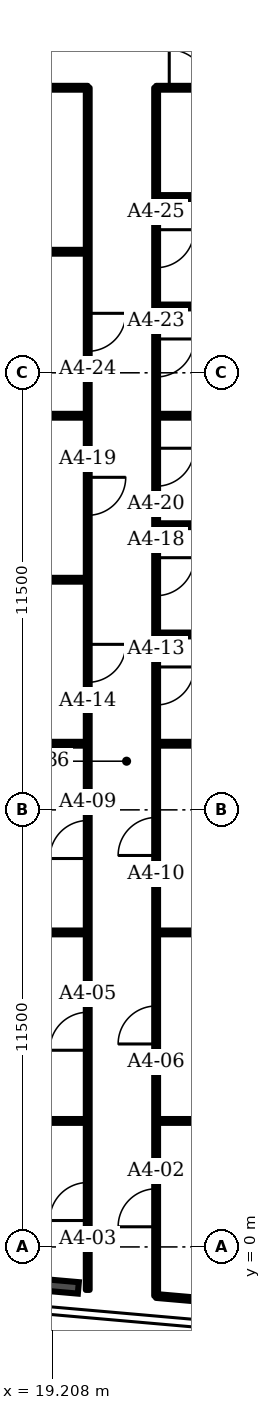
"""IFC4 building model, lengths in metres.
Left out: names, types, materials, properties, quantities, classifications, styles, units other than length and angle.
Written with IfcOpenShell. Run it as: python <this file> out.ifc"""

import sys

from ifc_helpers import new_model, si_unit, direction, frame, frame_2d, origin, origin_2d, place, context, subcontext, project, spatial, rectangle, i_section, extrude, element, fill, save


model = new_model("IFC4")
c1 = context("Model", 3, precision=1e-05, world=origin(), true_north=direction((0.0, 1.0)))
c2 = subcontext(c1, "Body", "Model", "MODEL_VIEW")
j1 = project(units=[si_unit("LENGTHUNIT", "METRE"), si_unit("PLANEANGLEUNIT", "RADIAN")], contexts=[c1])
p1 = place(None, origin())
s1 = spatial("IfcSite", under=j1, at=p1, CompositionType="ELEMENT")
p2 = place(p1, origin())
s2 = spatial("IfcBuilding", under=s1, at=p2, CompositionType="ELEMENT")
p3 = place(p2, frame((0.0, 0.0, 73.9)))
s3 = spatial("IfcBuildingStorey", under=s2, at=p3, CompositionType="ELEMENT", Elevation=73.9)
p4 = place(p3, frame((19.391, -1.034, 0.0), z_axis=(0.0, 0.0, 1.0), x_axis=(-0.087156, -0.996198, 0.0)))
e1 = element("IfcColumn", 1, at=p4, inside=s3, PredefinedType="COLUMN", context=c2, shape_type="SweptSolid", body=[
    extrude(i_section(OverallWidth=0.302, OverallDepth=1.008, WebThickness=0.021, FlangeThickness=0.04, FilletRadius=0.03, at=origin_2d()), origin(), (0.0, 0.0, 1.0), 3.6),
])
p5 = place(p3, frame((6.0, 8.275, 0.0), z_axis=(0.0, 0.0, 1.0), x_axis=(1.0, 0.0, 0.0)))
e2 = element("IfcWall", 2, at=p5, inside=s3, PredefinedType="PARTITIONING", context=c2, shape_type="SweptSolid", body=[
    extrude(rectangle(XDim=14.14, YDim=0.1, at=frame_2d((7.07, 0.0))), origin(), (0.0, 0.0, 1.0), 3.2),
])
p6 = place(p3, frame((6.02, 3.315, 0.0), z_axis=(0.0, 0.0, 1.0), x_axis=(1.0, 0.0, 0.0)))
e3 = element("IfcWall", 3, at=p6, inside=s3, PredefinedType="PARTITIONING", context=c2, shape_type="SweptSolid", body=[
    extrude(rectangle(XDim=14.12, YDim=0.1, at=frame_2d((7.06, 0.0))), origin(), (0.0, 0.0, 1.0), 3.2),
])
for number, where, z_axis, x_axis in (
    (4, (10.8, 21.87, 0.0), (0.0, 0.0, 1.0), (1.0, 0.0, 0.0)),
    (5, (10.8, 26.185, 0.0), (0.0, 0.0, 1.0), (1.0, 0.0, 0.0)),
):
    element("IfcWall", number, at=place(p3, frame(where, z_axis=z_axis, x_axis=x_axis)), inside=s3, PredefinedType="PARTITIONING", context=c2, shape_type="SweptSolid", body=[
        extrude(rectangle(XDim=9.34, YDim=0.1, at=frame_2d((4.67, 0.0))), origin(), (0.0, 0.0, 1.0), 3.2),
    ])
p7 = place(p3, frame((10.8, 30.5, 0.0), z_axis=(0.0, 0.0, 1.0), x_axis=(1.0, 0.0, 0.0)))
e6 = element("IfcWall", 6, at=p7, inside=s3, PredefinedType="PARTITIONING", context=c2, shape_type="SweptSolid", body=[
    extrude(rectangle(XDim=9.34, YDim=0.1, at=frame_2d((4.67, 0.0))), origin(), (0.0, 0.0, 1.0), 3.2),
])
p8 = place(p7, frame((4.185, 0.0, 0.0)))
e7 = element("IfcOpeningElement", 7, at=p8, cuts=e6, PredefinedType="OPENING", context=c2, shape_type="SweptSolid", body=[
    extrude(rectangle(XDim=1.0, YDim=2.1, at=frame_2d((0.5, 1.05))), frame((0.0, 0.06, 0.0), z_axis=(0.0, -1.0, 0.0), x_axis=(1.0, 0.0, 0.0)), (0.0, 0.0, 1.0), 0.12),
])
for number, where, z_axis, x_axis in (
    (8, (11.17, 13.24, 0.0), (0.0, 0.0, 1.0), (1.0, 0.0, 0.0)),
    (9, (11.17, 17.555, 0.0), (0.0, 0.0, 1.0), (1.0, 0.0, 0.0)),
):
    element("IfcWall", number, at=place(p3, frame(where, z_axis=z_axis, x_axis=x_axis)), inside=s3, PredefinedType="PARTITIONING", context=c2, shape_type="SweptSolid", body=[
        extrude(rectangle(XDim=8.97, YDim=0.1, at=frame_2d((4.485, 0.0))), origin(), (0.0, 0.0, 1.0), 3.2),
    ])
p9 = place(p3, frame((20.14, -1.13, 0.0), z_axis=(0.0, 0.0, 1.0), x_axis=(0.0, 1.0, 0.0)))
e10 = element("IfcWall", 10, at=p9, inside=s3, PredefinedType="PARTITIONING", context=c2, shape_type="SweptSolid", body=[
    extrude(rectangle(XDim=31.63, YDim=0.1, at=frame_2d((15.815, 0.0))), origin(), (0.0, 0.0, 1.0), 3.2),
])
p10 = place(p9, frame((1.825, 0.0, 0.0)))
e11 = element("IfcOpeningElement", 11, at=p10, cuts=e10, PredefinedType="OPENING", context=c2, shape_type="SweptSolid", body=[
    extrude(rectangle(XDim=1.0, YDim=2.1, at=frame_2d((0.5, 1.05))), frame((0.0, 0.06, 0.0), z_axis=(0.0, -1.0, 0.0), x_axis=(1.0, 0.0, 0.0)), (0.0, 0.0, 1.0), 0.12),
])
p11 = place(p9, frame((6.305, 0.0, 0.0)))
e12 = element("IfcOpeningElement", 12, at=p11, cuts=e10, PredefinedType="OPENING", context=c2, shape_type="SweptSolid", body=[
    extrude(rectangle(XDim=1.0, YDim=2.1, at=frame_2d((0.5, 1.05))), frame((0.0, 0.06, 0.0), z_axis=(0.0, -1.0, 0.0), x_axis=(1.0, 0.0, 0.0)), (0.0, 0.0, 1.0), 0.12),
])
p12 = place(p9, frame((11.35, 0.0, 0.0)))
e13 = element("IfcOpeningElement", 13, at=p12, cuts=e10, PredefinedType="OPENING", context=c2, shape_type="SweptSolid", body=[
    extrude(rectangle(XDim=1.0, YDim=2.1, at=frame_2d((0.5, 1.05))), frame((0.0, 0.06, 0.0), z_axis=(0.0, -1.0, 0.0), x_axis=(1.0, 0.0, 0.0)), (0.0, 0.0, 1.0), 0.12),
])
p13 = place(p9, frame((15.985, 0.0, 0.0)))
e14 = element("IfcOpeningElement", 14, at=p13, cuts=e10, PredefinedType="OPENING", context=c2, shape_type="SweptSolid", body=[
    extrude(rectangle(XDim=1.0, YDim=2.1, at=frame_2d((0.5, 1.05))), frame((0.0, 0.06, 0.0), z_axis=(0.0, -1.0, 0.0), x_axis=(1.0, 0.0, 0.0)), (0.0, 0.0, 1.0), 0.12),
])
p14 = place(p9, frame((20.38, 0.0, 0.0)))
e15 = element("IfcOpeningElement", 15, at=p14, cuts=e10, PredefinedType="OPENING", context=c2, shape_type="SweptSolid", body=[
    extrude(rectangle(XDim=1.0, YDim=2.1, at=frame_2d((0.5, 1.05))), frame((0.0, 0.06, 0.0), z_axis=(0.0, -1.0, 0.0), x_axis=(1.0, 0.0, 0.0)), (0.0, 0.0, 1.0), 0.12),
])
p15 = place(p9, frame((24.695, 0.0, 0.0)))
e16 = element("IfcOpeningElement", 16, at=p15, cuts=e10, PredefinedType="OPENING", context=c2, shape_type="SweptSolid", body=[
    extrude(rectangle(XDim=1.0, YDim=2.1, at=frame_2d((0.5, 1.05))), frame((0.0, 0.06, 0.0), z_axis=(0.0, -1.0, 0.0), x_axis=(1.0, 0.0, 0.0)), (0.0, 0.0, 1.0), 0.12),
])
p16 = place(p3, frame((21.94, -1.29, 0.0), z_axis=(0.0, 0.0, 1.0), x_axis=(0.0, 1.0, 0.0)))
e17 = element("IfcWall", 17, at=p16, inside=s3, PredefinedType="PARTITIONING", context=c2, shape_type="SweptSolid", body=[
    extrude(rectangle(XDim=31.79, YDim=0.1, at=frame_2d((15.895, 0.0))), origin(), (0.0, 0.0, 1.0), 3.2),
])
p17 = place(p16, frame((1.82, 0.0, 0.0)))
e18 = element("IfcOpeningElement", 18, at=p17, cuts=e17, PredefinedType="OPENING", context=c2, shape_type="SweptSolid", body=[
    extrude(rectangle(XDim=1.0, YDim=2.1, at=frame_2d((0.5, 1.05))), frame((0.0, 0.06, 0.0), z_axis=(0.0, -1.0, 0.0), x_axis=(1.0, 0.0, 0.0)), (0.0, 0.0, 1.0), 0.12),
])
p18 = place(p16, frame((6.63, 0.0, 0.0)))
e19 = element("IfcOpeningElement", 19, at=p18, cuts=e17, PredefinedType="OPENING", context=c2, shape_type="SweptSolid", body=[
    extrude(rectangle(XDim=1.0, YDim=2.1, at=frame_2d((0.5, 1.05))), frame((0.0, 0.06, 0.0), z_axis=(0.0, -1.0, 0.0), x_axis=(1.0, 0.0, 0.0)), (0.0, 0.0, 1.0), 0.12),
])
p19 = place(p16, frame((11.59, 0.0, 0.0)))
e20 = element("IfcOpeningElement", 20, at=p19, cuts=e17, PredefinedType="OPENING", context=c2, shape_type="SweptSolid", body=[
    extrude(rectangle(XDim=1.0, YDim=2.1, at=frame_2d((0.5, 1.05))), frame((0.0, 0.06, 0.0), z_axis=(0.0, -1.0, 0.0), x_axis=(1.0, 0.0, 0.0)), (0.0, 0.0, 1.0), 0.12),
])
p20 = place(p16, frame((15.55, 0.0, 0.0)))
e21 = element("IfcOpeningElement", 21, at=p20, cuts=e17, PredefinedType="OPENING", context=c2, shape_type="SweptSolid", body=[
    extrude(rectangle(XDim=1.0, YDim=2.1, at=frame_2d((0.5, 1.05))), frame((0.0, 0.06, 0.0), z_axis=(0.0, -1.0, 0.0), x_axis=(1.0, 0.0, 0.0)), (0.0, 0.0, 1.0), 0.12),
])
p21 = place(p16, frame((18.425, 0.0, 0.0)))
e22 = element("IfcOpeningElement", 22, at=p21, cuts=e17, PredefinedType="OPENING", context=c2, shape_type="SweptSolid", body=[
    extrude(rectangle(XDim=1.0, YDim=2.1, at=frame_2d((0.5, 1.05))), frame((0.0, 0.06, 0.0), z_axis=(0.0, -1.0, 0.0), x_axis=(1.0, 0.0, 0.0)), (0.0, 0.0, 1.0), 0.12),
])
p22 = place(p16, frame((21.305, 0.0, 0.0)))
e23 = element("IfcOpeningElement", 23, at=p22, cuts=e17, PredefinedType="OPENING", context=c2, shape_type="SweptSolid", body=[
    extrude(rectangle(XDim=1.0, YDim=2.1, at=frame_2d((0.5, 1.05))), frame((0.0, 0.06, 0.0), z_axis=(0.0, -1.0, 0.0), x_axis=(1.0, 0.0, 0.0)), (0.0, 0.0, 1.0), 0.12),
])
p23 = place(p16, frame((24.18, 0.0, 0.0)))
e24 = element("IfcOpeningElement", 24, at=p23, cuts=e17, PredefinedType="OPENING", context=c2, shape_type="SweptSolid", body=[
    extrude(rectangle(XDim=1.0, YDim=2.1, at=frame_2d((0.5, 1.05))), frame((0.0, 0.06, 0.0), z_axis=(0.0, -1.0, 0.0), x_axis=(1.0, 0.0, 0.0)), (0.0, 0.0, 1.0), 0.12),
])
p24 = place(p16, frame((27.055, 0.0, 0.0)))
e25 = element("IfcOpeningElement", 25, at=p24, cuts=e17, PredefinedType="OPENING", context=c2, shape_type="SweptSolid", body=[
    extrude(rectangle(XDim=1.0, YDim=2.1, at=frame_2d((0.5, 1.05))), frame((0.0, 0.06, 0.0), z_axis=(0.0, -1.0, 0.0), x_axis=(1.0, 0.0, 0.0)), (0.0, 0.0, 1.0), 0.12),
])
for number, where, z_axis, x_axis in (
    (26, (21.94, 3.315, 0.0), (0.0, 0.0, 1.0), (1.0, 0.0, 0.0)),
    (27, (21.94, 8.275, 0.0), (0.0, 0.0, 1.0), (1.0, 0.0, 0.0)),
):
    element("IfcWall", number, at=place(p3, frame(where, z_axis=z_axis, x_axis=x_axis)), inside=s3, PredefinedType="PARTITIONING", context=c2, shape_type="SweptSolid", body=[
        extrude(rectangle(XDim=4.06, YDim=0.1, at=frame_2d((2.03, 0.0))), origin(), (0.0, 0.0, 1.0), 3.2),
    ])
for number, where, z_axis, x_axis in (
    (28, (21.94, 13.24, 0.0), (0.0, 0.0, 1.0), (1.0, 0.0, 0.0)),
    (29, (21.94, 16.115, 0.0), (0.0, 0.0, 1.0), (1.0, 0.0, 0.0)),
    (30, (21.94, 18.99, 0.0), (0.0, 0.0, 1.0), (1.0, 0.0, 0.0)),
    (31, (21.94, 21.87, 0.0), (0.0, 0.0, 1.0), (1.0, 0.0, 0.0)),
    (32, (21.94, 24.745, 0.0), (0.0, 0.0, 1.0), (1.0, 0.0, 0.0)),
    (33, (21.94, 27.625, 0.0), (0.0, 0.0, 1.0), (1.0, 0.0, 0.0)),
):
    element("IfcWall", number, at=place(p3, frame(where, z_axis=z_axis, x_axis=x_axis)), inside=s3, PredefinedType="PARTITIONING", context=c2, shape_type="SweptSolid", body=[
        extrude(rectangle(XDim=4.725, YDim=0.1, at=frame_2d((2.363, 0.0))), origin(), (0.0, 0.0, 1.0), 3.2),
    ])
p25 = place(p3, frame((21.94, 30.5, 0.0), z_axis=(0.0, 0.0, 1.0), x_axis=(1.0, 0.0, 0.0)))
e34 = element("IfcWall", 34, at=p25, inside=s3, PredefinedType="PARTITIONING", context=c2, shape_type="SweptSolid", body=[
    extrude(rectangle(XDim=14.91, YDim=0.1, at=frame_2d((7.455, 0.0))), origin(), (0.0, 0.0, 1.0), 3.2),
])
p26 = place(p25, frame((0.345, 0.0, 0.0)))
e35 = element("IfcOpeningElement", 35, at=p26, cuts=e34, PredefinedType="OPENING", context=c2, shape_type="SweptSolid", body=[
    extrude(rectangle(XDim=1.0, YDim=2.1, at=frame_2d((0.5, 1.05))), frame((0.0, 0.06, 0.0), z_axis=(0.0, -1.0, 0.0), x_axis=(1.0, 0.0, 0.0)), (0.0, 0.0, 1.0), 0.12),
])
p27 = place(p25, frame((8.95, 0.0, 0.0)))
e36 = element("IfcOpeningElement", 36, at=p27, cuts=e34, PredefinedType="OPENING", context=c2, shape_type="SweptSolid", body=[
    extrude(rectangle(XDim=1.8, YDim=2.1, at=frame_2d((0.9, 1.05))), frame((0.0, 0.06, 0.0), z_axis=(0.0, -1.0, 0.0), x_axis=(1.0, 0.0, 0.0)), (0.0, 0.0, 1.0), 0.12),
])
p28 = place(p3, frame((33.22, -2.275, 0.0), z_axis=(0.0, 0.0, 1.0), x_axis=(-0.996212, 0.086913, 0.0)))
e37 = element("IfcWall", 37, at=p28, inside=s3, PredefinedType="PARTITIONING", context=c2, shape_type="SweptSolid", body=[
    extrude(rectangle(XDim=11.323, YDim=0.1, at=frame_2d((5.662, 0.0))), origin(), (0.0, 0.0, 1.0), 2.58),
])
p29 = place(p17, origin())
e38 = element("IfcDoor", 38, at=p29, inside=s3, OperationType="SINGLE_SWING_LEFT", PredefinedType="DOOR", context=c2, shape_type="SweptSolid", body=[
    extrude(rectangle(XDim=1.0, YDim=2.1, at=frame_2d((0.5, 1.05))), frame((0.0, 0.025, 0.0), z_axis=(0.0, -1.0, 0.0), x_axis=(1.0, 0.0, 0.0)), (0.0, 0.0, 1.0), 0.05),
])
fill(e18, e38)
p30 = place(p10, origin())
e39 = element("IfcDoor", 39, at=p30, inside=s3, OperationType="SINGLE_SWING_LEFT", PredefinedType="DOOR", context=c2, shape_type="SweptSolid", body=[
    extrude(rectangle(XDim=1.0, YDim=2.1, at=frame_2d((0.5, 1.05))), frame((0.0, 0.025, 0.0), z_axis=(0.0, -1.0, 0.0), x_axis=(1.0, 0.0, 0.0)), (0.0, 0.0, 1.0), 0.05),
])
fill(e11, e39)
p31 = place(p11, origin())
e40 = element("IfcDoor", 40, at=p31, inside=s3, OperationType="SINGLE_SWING_LEFT", PredefinedType="DOOR", context=c2, shape_type="SweptSolid", body=[
    extrude(rectangle(XDim=1.0, YDim=2.1, at=frame_2d((0.5, 1.05))), frame((0.0, 0.025, 0.0), z_axis=(0.0, -1.0, 0.0), x_axis=(1.0, 0.0, 0.0)), (0.0, 0.0, 1.0), 0.05),
])
fill(e12, e40)
p32 = place(p18, origin())
e41 = element("IfcDoor", 41, at=p32, inside=s3, OperationType="SINGLE_SWING_LEFT", PredefinedType="DOOR", context=c2, shape_type="SweptSolid", body=[
    extrude(rectangle(XDim=1.0, YDim=2.1, at=frame_2d((0.5, 1.05))), frame((0.0, 0.025, 0.0), z_axis=(0.0, -1.0, 0.0), x_axis=(1.0, 0.0, 0.0)), (0.0, 0.0, 1.0), 0.05),
])
fill(e19, e41)
p33 = place(p12, origin())
e42 = element("IfcDoor", 42, at=p33, inside=s3, OperationType="SINGLE_SWING_LEFT", PredefinedType="DOOR", context=c2, shape_type="SweptSolid", body=[
    extrude(rectangle(XDim=1.0, YDim=2.1, at=frame_2d((0.5, 1.05))), frame((0.0, 0.025, 0.0), z_axis=(0.0, -1.0, 0.0), x_axis=(1.0, 0.0, 0.0)), (0.0, 0.0, 1.0), 0.05),
])
fill(e13, e42)
p34 = place(p19, origin())
e43 = element("IfcDoor", 43, at=p34, inside=s3, OperationType="SINGLE_SWING_LEFT", PredefinedType="DOOR", context=c2, shape_type="SweptSolid", body=[
    extrude(rectangle(XDim=1.0, YDim=2.1, at=frame_2d((0.5, 1.05))), frame((0.0, 0.025, 0.0), z_axis=(0.0, -1.0, 0.0), x_axis=(1.0, 0.0, 0.0)), (0.0, 0.0, 1.0), 0.05),
])
fill(e20, e43)
p35 = place(p20, origin())
e44 = element("IfcDoor", 44, at=p35, inside=s3, OperationType="SINGLE_SWING_RIGHT", PredefinedType="DOOR", context=c2, shape_type="SweptSolid", body=[
    extrude(rectangle(XDim=1.0, YDim=2.1, at=frame_2d((0.5, 1.05))), frame((0.0, 0.025, 0.0), z_axis=(0.0, -1.0, 0.0), x_axis=(1.0, 0.0, 0.0)), (0.0, 0.0, 1.0), 0.05),
])
fill(e21, e44)
p36 = place(p13, origin())
e45 = element("IfcDoor", 45, at=p36, inside=s3, OperationType="SINGLE_SWING_RIGHT", PredefinedType="DOOR", context=c2, shape_type="SweptSolid", body=[
    extrude(rectangle(XDim=1.0, YDim=2.1, at=frame_2d((0.5, 1.05))), frame((0.0, 0.025, 0.0), z_axis=(0.0, -1.0, 0.0), x_axis=(1.0, 0.0, 0.0)), (0.0, 0.0, 1.0), 0.05),
])
fill(e14, e45)
p37 = place(p21, origin())
e46 = element("IfcDoor", 46, at=p37, inside=s3, OperationType="SINGLE_SWING_RIGHT", PredefinedType="DOOR", context=c2, shape_type="SweptSolid", body=[
    extrude(rectangle(XDim=1.0, YDim=2.1, at=frame_2d((0.5, 1.05))), frame((0.0, 0.025, 0.0), z_axis=(0.0, -1.0, 0.0), x_axis=(1.0, 0.0, 0.0)), (0.0, 0.0, 1.0), 0.05),
])
fill(e22, e46)
p38 = place(p14, origin())
e47 = element("IfcDoor", 47, at=p38, inside=s3, OperationType="SINGLE_SWING_RIGHT", PredefinedType="DOOR", context=c2, shape_type="SweptSolid", body=[
    extrude(rectangle(XDim=1.0, YDim=2.1, at=frame_2d((0.5, 1.05))), frame((0.0, 0.025, 0.0), z_axis=(0.0, -1.0, 0.0), x_axis=(1.0, 0.0, 0.0)), (0.0, 0.0, 1.0), 0.05),
])
fill(e15, e47)
p39 = place(p22, origin())
e48 = element("IfcDoor", 48, at=p39, inside=s3, OperationType="SINGLE_SWING_RIGHT", PredefinedType="DOOR", context=c2, shape_type="SweptSolid", body=[
    extrude(rectangle(XDim=1.0, YDim=2.1, at=frame_2d((0.5, 1.05))), frame((0.0, 0.025, 0.0), z_axis=(0.0, -1.0, 0.0), x_axis=(1.0, 0.0, 0.0)), (0.0, 0.0, 1.0), 0.05),
])
fill(e23, e48)
p40 = place(p23, origin())
e49 = element("IfcDoor", 49, at=p40, inside=s3, OperationType="SINGLE_SWING_RIGHT", PredefinedType="DOOR", context=c2, shape_type="SweptSolid", body=[
    extrude(rectangle(XDim=1.0, YDim=2.1, at=frame_2d((0.5, 1.05))), frame((0.0, 0.025, 0.0), z_axis=(0.0, -1.0, 0.0), x_axis=(1.0, 0.0, 0.0)), (0.0, 0.0, 1.0), 0.05),
])
fill(e24, e49)
p41 = place(p15, origin())
e50 = element("IfcDoor", 50, at=p41, inside=s3, OperationType="SINGLE_SWING_RIGHT", PredefinedType="DOOR", context=c2, shape_type="SweptSolid", body=[
    extrude(rectangle(XDim=1.0, YDim=2.1, at=frame_2d((0.5, 1.05))), frame((0.0, 0.025, 0.0), z_axis=(0.0, -1.0, 0.0), x_axis=(1.0, 0.0, 0.0)), (0.0, 0.0, 1.0), 0.05),
])
fill(e16, e50)
p42 = place(p24, origin())
e51 = element("IfcDoor", 51, at=p42, inside=s3, OperationType="SINGLE_SWING_RIGHT", PredefinedType="DOOR", context=c2, shape_type="SweptSolid", body=[
    extrude(rectangle(XDim=1.0, YDim=2.1, at=frame_2d((0.5, 1.05))), frame((0.0, 0.025, 0.0), z_axis=(0.0, -1.0, 0.0), x_axis=(1.0, 0.0, 0.0)), (0.0, 0.0, 1.0), 0.05),
])
fill(e25, e51)
p43 = place(p26, origin())
e52 = element("IfcDoor", 52, at=p43, inside=s3, OperationType="SINGLE_SWING_LEFT", PredefinedType="DOOR", context=c2, shape_type="SweptSolid", body=[
    extrude(rectangle(XDim=1.0, YDim=2.1, at=frame_2d((0.5, 1.05))), frame((0.0, 0.025, 0.0), z_axis=(0.0, -1.0, 0.0), x_axis=(1.0, 0.0, 0.0)), (0.0, 0.0, 1.0), 0.05),
])
fill(e35, e52)
save(model, sys.argv[1])
